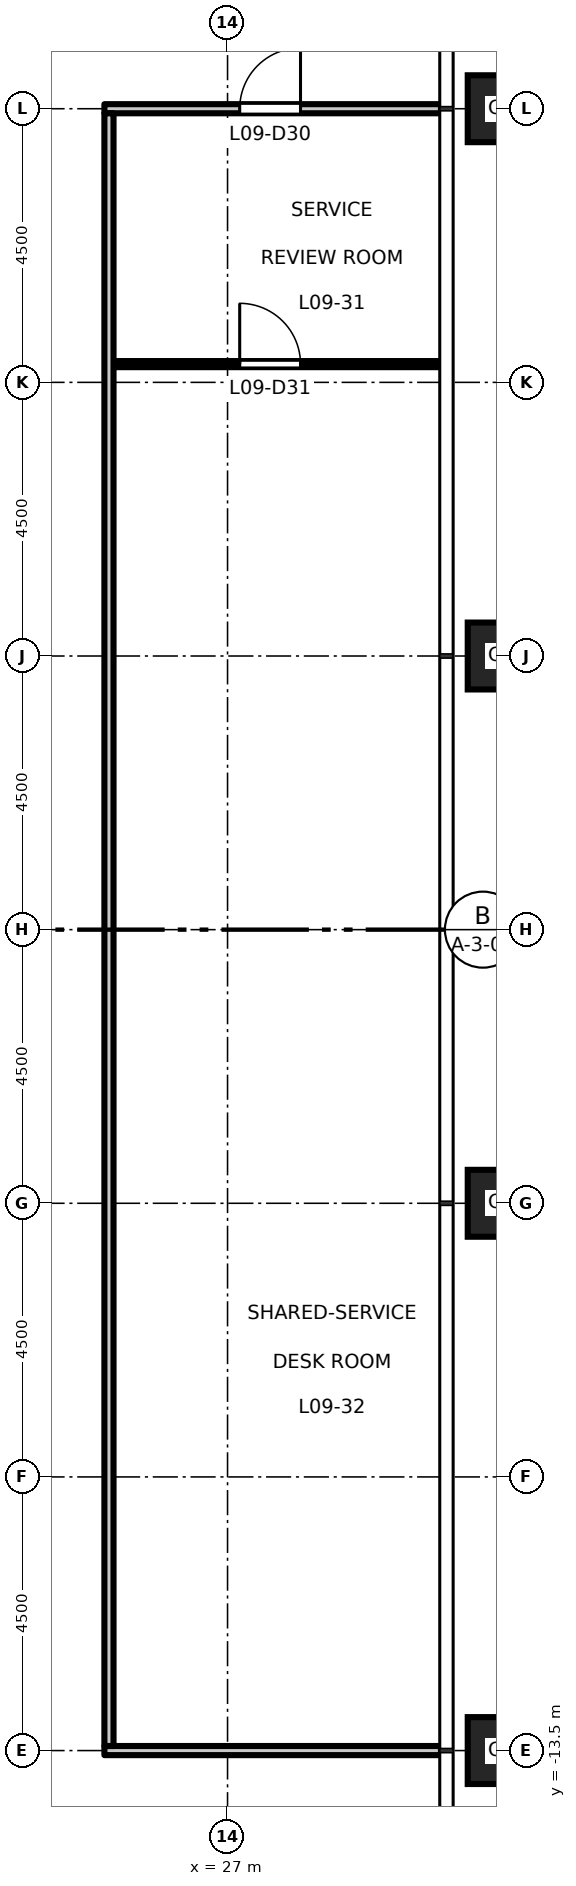
"""IFC4 building model, lengths in metres.
Left out: names, types, materials, properties, quantities, classifications, styles, units other than length and angle.
Written with IfcOpenShell. Run it as: python <this file> out.ifc"""

import sys

from ifc_helpers import new_model, si_unit, direction, frame, frame_2d, origin, origin_2d, place, context, subcontext, project, spatial, rectangle, hollow_rectangle, extrude, element, fill, save


model = new_model("IFC4")
c1 = context("Model", 3, precision=1e-05, world=origin(), true_north=direction((0.0, 1.0)))
c2 = subcontext(c1, "Body", "Model", "MODEL_VIEW")
j1 = project(units=[si_unit("LENGTHUNIT", "METRE"), si_unit("PLANEANGLEUNIT", "RADIAN")], contexts=[c1])
p1 = place(None, origin())
s1 = spatial("IfcSite", under=j1, at=p1, CompositionType="ELEMENT")
p2 = place(p1, origin())
s2 = spatial("IfcBuilding", under=s1, at=p2, CompositionType="ELEMENT")
p3 = place(p2, frame((0.0, 0.0, 44.7)))
s3 = spatial("IfcBuildingStorey", under=s2, at=p3, CompositionType="ELEMENT", Elevation=44.7)
for number, where, z_axis, x_axis in (
    (1, (31.5, -13.5, 0.0), (0.0, 0.0, 1.0), (1.0, 0.0, 0.0)),
    (2, (31.5, -4.5, 0.0), (0.0, 0.0, 1.0), (1.0, 0.0, 0.0)),
    (3, (31.5, 4.5, 0.0), (0.0, 0.0, 1.0), (1.0, 0.0, 0.0)),
    (4, (31.5, 13.5, 0.0), (0.0, 0.0, 1.0), (1.0, 0.0, 0.0)),
):
    element("IfcColumn", number, at=place(p3, frame(where, z_axis=z_axis, x_axis=x_axis)), inside=s3, PredefinedType="COLUMN", context=c2, shape_type="SweptSolid", body=[
        extrude(hollow_rectangle(XDim=1.1, YDim=1.1, WallThickness=0.07, at=origin_2d()), origin(), (0.0, 0.0, 1.0), 4.5),
    ])
p4 = place(p3, frame((24.975, -13.5, 0.0), z_axis=(0.0, 0.0, 1.0), x_axis=(1.0, 0.0, 0.0)))
e5 = element("IfcWall", 5, at=p4, inside=s3, PredefinedType="PARTITIONING", context=c2, shape_type="SweptSolid", body=[
    extrude(rectangle(XDim=5.535, YDim=0.15, at=frame_2d((2.768, 0.0))), origin(), (0.0, 0.0, 1.0), 3.35),
])
p5 = place(p3, frame((25.125, 9.3, 0.0), z_axis=(0.0, 0.0, 1.0), x_axis=(1.0, 0.0, 0.0)))
e6 = element("IfcWall", 6, at=p5, inside=s3, PredefinedType="PARTITIONING", context=c2, shape_type="SweptSolid", body=[
    extrude(rectangle(XDim=5.385, YDim=0.1, at=frame_2d((2.692, 0.0))), origin(), (0.0, 0.0, 1.0), 4.35),
])
p6 = place(p5, frame((2.075, 0.0, 0.0)))
e7 = element("IfcOpeningElement", 7, at=p6, cuts=e6, PredefinedType="OPENING", context=c2, shape_type="SweptSolid", body=[
    extrude(rectangle(XDim=1.0, YDim=2.1, at=frame_2d((0.5, 1.05))), frame((0.0, 0.06, 0.0), z_axis=(0.0, -1.0, 0.0), x_axis=(1.0, 0.0, 0.0)), (0.0, 0.0, 1.0), 0.12),
])
p7 = place(p3, frame((24.975, 13.5, 0.0), z_axis=(0.0, 0.0, 1.0), x_axis=(1.0, 0.0, 0.0)))
e8 = element("IfcWall", 8, at=p7, inside=s3, PredefinedType="PARTITIONING", context=c2, shape_type="SweptSolid", body=[
    extrude(rectangle(XDim=5.535, YDim=0.15, at=frame_2d((2.768, 0.0))), origin(), (0.0, 0.0, 1.0), 3.35),
])
p8 = place(p7, frame((2.225, 0.0, 0.0)))
e9 = element("IfcOpeningElement", 9, at=p8, cuts=e8, PredefinedType="OPENING", context=c2, shape_type="SweptSolid", body=[
    extrude(rectangle(XDim=1.0, YDim=2.1, at=frame_2d((0.5, 1.05))), frame((0.0, 0.085, 0.0), z_axis=(0.0, -1.0, 0.0), x_axis=(1.0, 0.0, 0.0)), (0.0, 0.0, 1.0), 0.17),
])
p9 = place(p3, frame((25.05, -13.425, 0.0), z_axis=(0.0, 0.0, 1.0), x_axis=(0.0, 1.0, 0.0)))
e10 = element("IfcWall", 10, at=p9, inside=s3, PredefinedType="PARTITIONING", context=c2, shape_type="SweptSolid", body=[
    extrude(rectangle(XDim=26.85, YDim=0.15, at=frame_2d((13.425, 0.0))), origin(), (0.0, 0.0, 1.0), 4.35),
])
p10 = place(p8, origin())
e11 = element("IfcDoor", 11, at=p10, inside=s3, OperationType="SINGLE_SWING_RIGHT", PredefinedType="DOOR", context=c2, shape_type="SweptSolid", body=[
    extrude(rectangle(XDim=1.0, YDim=2.1, at=frame_2d((0.5, 1.05))), frame((0.0, 0.025, 0.0), z_axis=(0.0, -1.0, 0.0), x_axis=(1.0, 0.0, 0.0)), (0.0, 0.0, 1.0), 0.05),
])
fill(e9, e11)
p11 = place(p6, origin())
e12 = element("IfcDoor", 12, at=p11, inside=s3, OperationType="SINGLE_SWING_LEFT", PredefinedType="DOOR", context=c2, shape_type="SweptSolid", body=[
    extrude(rectangle(XDim=1.0, YDim=2.1, at=frame_2d((0.5, 1.05))), frame((0.0, 0.025, 0.0), z_axis=(0.0, -1.0, 0.0), x_axis=(1.0, 0.0, 0.0)), (0.0, 0.0, 1.0), 0.05),
])
fill(e7, e12)
save(model, sys.argv[1])
